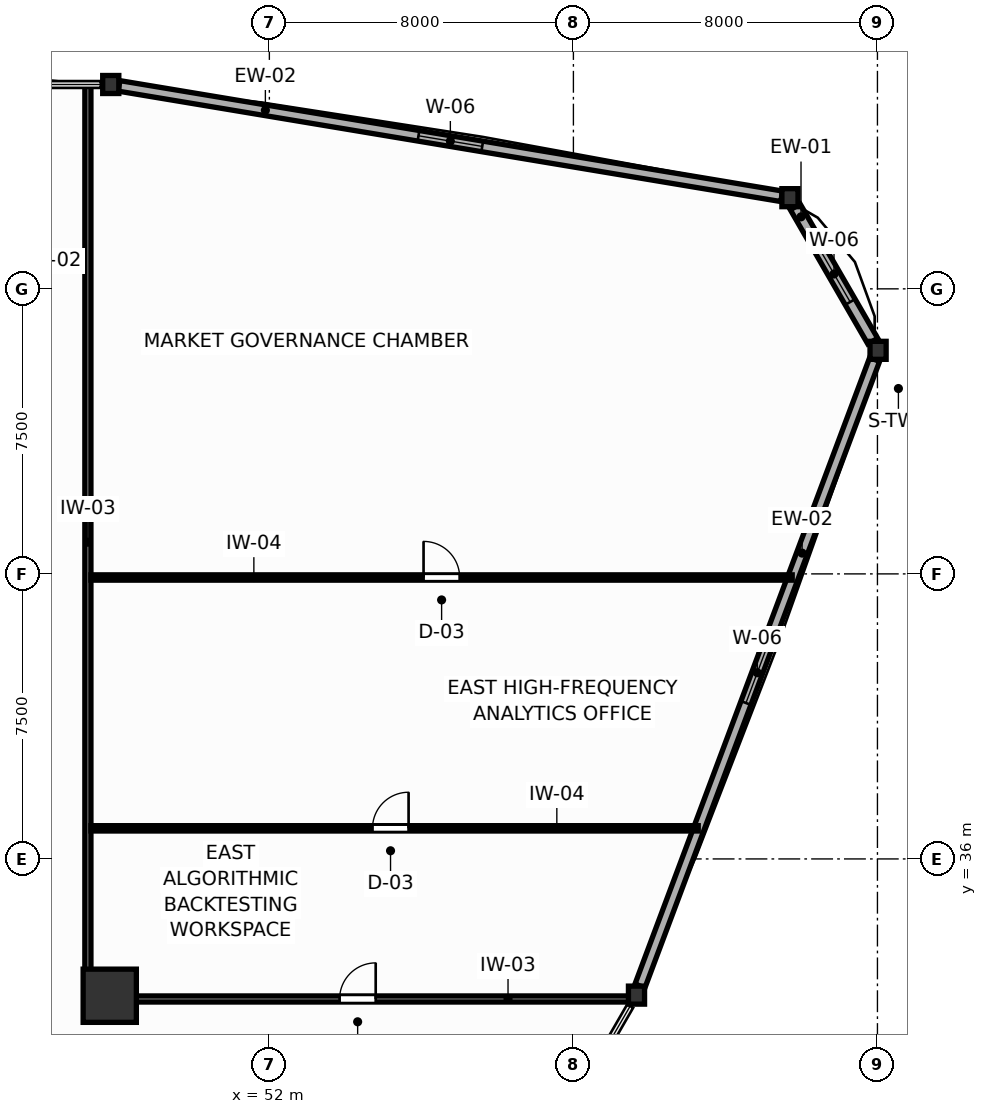
"""IFC4 building model, lengths in metres.
Left out: names, types, materials, properties, quantities, classifications, styles, units other than length and angle.
Written with IfcOpenShell. Run it as: python <this file> out.ifc"""

import sys

from ifc_helpers import new_model, si_unit, direction, frame, frame_2d, origin, origin_2d, place, context, subcontext, project, spatial, rectangle, i_section, extrude, source, transform, mapped, element, fill, save


model = new_model("IFC4")
c1 = context("Model", 3, precision=1e-05, world=origin(), true_north=direction((0.0, 1.0)))
c2 = subcontext(c1, "Body", "Model", "MODEL_VIEW")
j1 = project(units=[si_unit("LENGTHUNIT", "METRE"), si_unit("PLANEANGLEUNIT", "RADIAN")], contexts=[c1])
p1 = place(None, origin())
s1 = spatial("IfcSite", under=j1, at=p1, CompositionType="ELEMENT")
p2 = place(p1, origin())
s2 = spatial("IfcBuilding", under=s1, at=p2, CompositionType="ELEMENT")
p3 = place(p2, frame((0.0, 0.0, 71.7)))
s3 = spatial("IfcBuildingStorey", under=s2, at=p3, CompositionType="ELEMENT", Elevation=71.7)
m1 = source(origin(), c2, "Body", "SweptSolid", [
    extrude(rectangle(XDim=1.4, YDim=1.4, at=origin_2d()), origin(), (0.0, 0.0, 1.0), 3.9),
])
p4 = place(p3, frame((47.8, 32.4, 0.0), z_axis=(0.0, 0.0, 1.0), x_axis=(1.0, 0.0, 0.0)))
e1 = element("IfcColumn", 1, at=p4, inside=s3, PredefinedType="COLUMN", context=c2, shape_type="MappedRepresentation", body=[
    mapped(m1, transform((0.0, 0.0, 0.0), scale=1.0)),
])
m2 = source(origin(), c2, "Body", "SweptSolid", [
    extrude(i_section(OverallWidth=0.424, OverallDepth=0.474, WebThickness=0.045, FlangeThickness=0.072, FilletRadius=0.015, at=origin_2d()), origin(), (0.0, 0.0, 1.0), 3.9),
])
for number, where, z_axis, x_axis in (
    (2, (68.017, 49.382, 0.0), (0.0, 0.0, 1.0), (1.0, 0.0, 0.0)),
    (3, (65.698, 53.399, 0.0), (0.0, 0.0, 1.0), (1.0, 0.0, 0.0)),
    (4, (47.827, 56.377, 0.0), (0.0, 0.0, 1.0), (1.0, 0.0, 0.0)),
    (5, (61.66, 32.417, 0.0), (0.0, 0.0, 1.0), (1.0, 0.0, 0.0)),
):
    element("IfcColumn", number, at=place(p3, frame(where, z_axis=z_axis, x_axis=x_axis)), inside=s3, PredefinedType="COLUMN", context=c2, shape_type="MappedRepresentation", body=[
        mapped(m2, transform((0.0, 0.0, 0.0), scale=1.0)),
    ])
p5 = place(p3, frame((67.877, 49.624, 0.0), z_axis=(0.0, 0.0, 1.0), x_axis=(-0.500014317814, 0.866017137233, 0.0)))
e6 = element("IfcWall", 6, at=p5, inside=s3, PredefinedType="SOLIDWALL", context=c2, shape_type="SweptSolid", body=[
    extrude(rectangle(XDim=4.079, YDim=0.3, at=frame_2d((2.04, 0.0))), origin(), (0.0, 0.0, 1.0), 2.08),
])
p6 = place(p5, frame((1.189, 0.0, 0.75)))
e7 = element("IfcOpeningElement", 7, at=p6, cuts=e6, PredefinedType="OPENING", context=c2, shape_type="SweptSolid", body=[
    extrude(rectangle(XDim=1.7, YDim=1.15, at=frame_2d((0.85, 0.575))), frame((0.0, 0.16, 0.0), z_axis=(0.0, -1.0, 0.0), x_axis=(1.0, 0.0, 0.0)), (0.0, 0.0, 1.0), 0.32),
])
p7 = place(p3, frame((65.481, 53.435, 0.0), z_axis=(0.0, 0.0, 1.0), x_axis=(-0.986399895449, 0.16436315359, 0.0)))
e8 = element("IfcWall", 8, at=p7, inside=s3, PredefinedType="SOLIDWALL", context=c2, shape_type="SweptSolid", body=[
    extrude(rectangle(XDim=17.677, YDim=0.28, at=frame_2d((8.839, 0.0))), origin(), (0.0, 0.0, 1.0), 2.08),
])
p8 = place(p7, frame((7.989, 0.0, 0.75)))
e9 = element("IfcOpeningElement", 9, at=p8, cuts=e8, PredefinedType="OPENING", context=c2, shape_type="SweptSolid", body=[
    extrude(rectangle(XDim=1.7, YDim=1.15, at=frame_2d((0.85, 0.575))), frame((0.0, 0.15, 0.0), z_axis=(0.0, -1.0, 0.0), x_axis=(1.0, 0.0, 0.0)), (0.0, 0.0, 1.0), 0.3),
])
p9 = place(p3, frame((61.751, 32.658, 0.0), z_axis=(0.0, 0.0, 1.0), x_axis=(0.350833077365, 0.936438012805, 0.0)))
e10 = element("IfcWall", 10, at=p9, inside=s3, PredefinedType="SOLIDWALL", context=c2, shape_type="SweptSolid", body=[
    extrude(rectangle(XDim=17.6, YDim=0.28, at=frame_2d((8.8, 0.0))), origin(), (0.0, 0.0, 1.0), 2.08),
])
p10 = place(p9, frame((7.95, 0.0, 0.75)))
e11 = element("IfcOpeningElement", 11, at=p10, cuts=e10, PredefinedType="OPENING", context=c2, shape_type="SweptSolid", body=[
    extrude(rectangle(XDim=1.7, YDim=1.15, at=frame_2d((0.85, 0.575))), frame((0.0, 0.15, 0.0), z_axis=(0.0, -1.0, 0.0), x_axis=(1.0, 0.0, 0.0)), (0.0, 0.0, 1.0), 0.3),
])
p11 = place(p3, frame((47.225, 32.31, 0.0), z_axis=(0.0, 0.0, 1.0), x_axis=(0.0, 1.0, 0.0)))
e12 = element("IfcWall", 12, at=p11, inside=s3, PredefinedType="PARTITIONING", context=c2, shape_type="SweptSolid", body=[
    extrude(rectangle(XDim=24.047, YDim=0.16, at=frame_2d((12.023, 0.0))), origin(), (0.0, 0.0, 1.0), 2.24),
])
p12 = place(p3, frame((47.307, 32.315, 0.0), z_axis=(0.0, 0.0, 1.0), x_axis=(1.0, 0.0, 0.0)))
e13 = element("IfcWall", 13, at=p12, inside=s3, PredefinedType="PARTITIONING", context=c2, shape_type="SweptSolid", body=[
    extrude(rectangle(XDim=14.275, YDim=0.16, at=frame_2d((7.137, 0.0))), origin(), (0.0, 0.0, 1.0), 2.24),
])
p13 = place(p12, frame((6.541, 0.0, 0.0)))
e14 = element("IfcOpeningElement", 14, at=p13, cuts=e13, PredefinedType="OPENING", context=c2, shape_type="SweptSolid", body=[
    extrude(rectangle(XDim=0.95, YDim=2.05, at=frame_2d((0.475, 1.025))), frame((0.0, 0.09, 0.0), z_axis=(0.0, -1.0, 0.0), x_axis=(1.0, 0.0, 0.0)), (0.0, 0.0, 1.0), 0.18),
])
p14 = place(p3, frame((47.307, 43.405, 0.0), z_axis=(0.0, 0.0, 1.0), x_axis=(1.0, 0.0, 0.0)))
e15 = element("IfcWall", 15, at=p14, inside=s3, PredefinedType="PARTITIONING", context=c2, shape_type="SweptSolid", body=[
    extrude(rectangle(XDim=18.45, YDim=0.14, at=frame_2d((9.225, 0.0))), origin(), (0.0, 0.0, 1.0), 3.68),
])
p15 = place(p14, frame((8.75, 0.0, 0.0)))
e16 = element("IfcOpeningElement", 16, at=p15, cuts=e15, PredefinedType="OPENING", context=c2, shape_type="SweptSolid", body=[
    extrude(rectangle(XDim=0.95, YDim=2.05, at=frame_2d((0.475, 1.025))), frame((0.0, 0.08, 0.0), z_axis=(0.0, -1.0, 0.0), x_axis=(1.0, 0.0, 0.0)), (0.0, 0.0, 1.0), 0.16),
])
p16 = place(p3, frame((47.307, 36.805, 0.0), z_axis=(0.0, 0.0, 1.0), x_axis=(1.0, 0.0, 0.0)))
e17 = element("IfcWall", 17, at=p16, inside=s3, PredefinedType="PARTITIONING", context=c2, shape_type="SweptSolid", body=[
    extrude(rectangle(XDim=15.978, YDim=0.14, at=frame_2d((7.989, 0.0))), origin(), (0.0, 0.0, 1.0), 3.68),
])
p17 = place(p16, frame((7.406, 0.0, 0.0)))
e18 = element("IfcOpeningElement", 18, at=p17, cuts=e17, PredefinedType="OPENING", context=c2, shape_type="SweptSolid", body=[
    extrude(rectangle(XDim=0.95, YDim=2.05, at=frame_2d((0.475, 1.025))), frame((0.0, 0.08, 0.0), z_axis=(0.0, -1.0, 0.0), x_axis=(1.0, 0.0, 0.0)), (0.0, 0.0, 1.0), 0.16),
])
p18 = place(p6, origin())
e19 = element("IfcWindow", 19, at=p18, inside=s3, PartitioningType="SINGLE_PANEL", PredefinedType="WINDOW", context=c2, shape_type="SweptSolid", body=[
    extrude(rectangle(XDim=1.7, YDim=1.15, at=frame_2d((0.85, 0.575))), frame((0.0, 0.03, 0.0), z_axis=(0.0, -1.0, 0.0), x_axis=(1.0, 0.0, 0.0)), (0.0, 0.0, 1.0), 0.06),
])
fill(e7, e19)
p19 = place(p8, origin())
e20 = element("IfcWindow", 20, at=p19, inside=s3, PartitioningType="SINGLE_PANEL", PredefinedType="WINDOW", context=c2, shape_type="SweptSolid", body=[
    extrude(rectangle(XDim=1.7, YDim=1.15, at=frame_2d((0.85, 0.575))), frame((0.0, 0.03, 0.0), z_axis=(0.0, -1.0, 0.0), x_axis=(1.0, 0.0, 0.0)), (0.0, 0.0, 1.0), 0.06),
])
fill(e9, e20)
p20 = place(p10, origin())
e21 = element("IfcWindow", 21, at=p20, inside=s3, PartitioningType="SINGLE_PANEL", PredefinedType="WINDOW", context=c2, shape_type="SweptSolid", body=[
    extrude(rectangle(XDim=1.7, YDim=1.15, at=frame_2d((0.85, 0.575))), frame((0.0, 0.03, 0.0), z_axis=(0.0, -1.0, 0.0), x_axis=(1.0, 0.0, 0.0)), (0.0, 0.0, 1.0), 0.06),
])
fill(e11, e21)
p21 = place(p13, origin())
e22 = element("IfcDoor", 22, at=p21, inside=s3, OperationType="SINGLE_SWING_RIGHT", PredefinedType="DOOR", context=c2, shape_type="SweptSolid", body=[
    extrude(rectangle(XDim=0.95, YDim=2.05, at=frame_2d((0.475, 1.025))), frame((0.0, 0.025, 0.0), z_axis=(0.0, -1.0, 0.0), x_axis=(1.0, 0.0, 0.0)), (0.0, 0.0, 1.0), 0.05),
])
fill(e14, e22)
p22 = place(p15, origin())
e23 = element("IfcDoor", 23, at=p22, inside=s3, OperationType="SINGLE_SWING_LEFT", PredefinedType="DOOR", context=c2, shape_type="SweptSolid", body=[
    extrude(rectangle(XDim=0.95, YDim=2.05, at=frame_2d((0.475, 1.025))), frame((0.0, 0.025, 0.0), z_axis=(0.0, -1.0, 0.0), x_axis=(1.0, 0.0, 0.0)), (0.0, 0.0, 1.0), 0.05),
])
fill(e16, e23)
p23 = place(p17, origin())
e24 = element("IfcDoor", 24, at=p23, inside=s3, OperationType="SINGLE_SWING_RIGHT", PredefinedType="DOOR", context=c2, shape_type="SweptSolid", body=[
    extrude(rectangle(XDim=0.95, YDim=2.05, at=frame_2d((0.475, 1.025))), frame((0.0, 0.025, 0.0), z_axis=(0.0, -1.0, 0.0), x_axis=(1.0, 0.0, 0.0)), (0.0, 0.0, 1.0), 0.05),
])
fill(e18, e24)
save(model, sys.argv[1])
